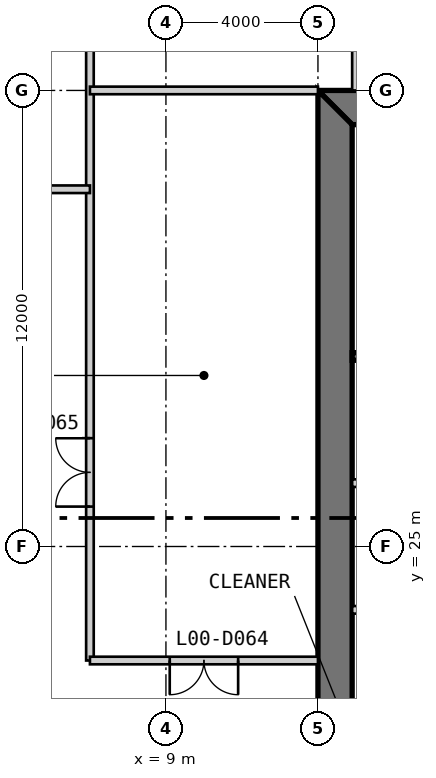
"""IFC4 building model, lengths in metres.
Left out: names, types, materials, properties, quantities, classifications, styles, units other than length and angle.
Written with IfcOpenShell. Run it as: python <this file> out.ifc"""

import sys

from ifc_helpers import new_model, si_unit, direction, frame, frame_2d, origin, place, context, subcontext, project, spatial, polyline, rectangle, outline, extrude, element, fill, save


model = new_model("IFC4")
c1 = context("Model", 3, precision=1e-05, world=origin(), true_north=direction((0.0, 1.0)))
c2 = subcontext(c1, "Body", "Model", "MODEL_VIEW")
j1 = project(units=[si_unit("LENGTHUNIT", "METRE"), si_unit("PLANEANGLEUNIT", "RADIAN")], contexts=[c1])
p1 = place(None, origin())
s1 = spatial("IfcSite", under=j1, at=p1, CompositionType="ELEMENT")
p2 = place(p1, origin())
s2 = spatial("IfcBuilding", under=s1, at=p2, CompositionType="ELEMENT")
p3 = place(p2, origin())
s3 = spatial("IfcBuildingStorey", under=s2, at=p3, CompositionType="ELEMENT", Elevation=0.0)
p4 = place(p3, frame((37.0, 36.55, 0.0), z_axis=(0.0, 0.0, 1.0), x_axis=(-1.0, 0.0, 0.0)))
e1 = element("IfcWall", 1, at=p4, inside=s3, PredefinedType="SHEAR", context=c2, shape_type="SweptSolid", body=[
    extrude(outline(polyline([(0.0, -0.45), (24.0, -0.45), (23.1, 0.45), (0.9, 0.45), (0.0, -0.45)])), origin(), (0.0, 0.0, 1.0), 7.0),
])
p5 = place(p4, frame((4.9, 0.0, 0.0)))
e2 = element("IfcOpeningElement", 2, at=p5, cuts=e1, PredefinedType="OPENING", context=c2, shape_type="SweptSolid", body=[
    extrude(rectangle(XDim=1.0, YDim=2.2, at=frame_2d((0.5, 1.1))), frame((0.0, 0.46, 0.0), z_axis=(0.0, -1.0, 0.0), x_axis=(1.0, 0.0, 0.0)), (0.0, 0.0, 1.0), 0.92),
])
p6 = place(p4, frame((8.9, 0.0, 0.0)))
e3 = element("IfcOpeningElement", 3, at=p6, cuts=e1, PredefinedType="OPENING", context=c2, shape_type="SweptSolid", body=[
    extrude(rectangle(XDim=1.1, YDim=2.2, at=frame_2d((0.55, 1.1))), frame((0.0, 0.46, 0.0), z_axis=(0.0, -1.0, 0.0), x_axis=(1.0, 0.0, 0.0)), (0.0, 0.0, 1.0), 0.92),
])
p7 = place(p4, frame((15.05, 0.0, 0.0)))
e4 = element("IfcOpeningElement", 4, at=p7, cuts=e1, PredefinedType="OPENING", context=c2, shape_type="SweptSolid", body=[
    extrude(rectangle(XDim=0.9, YDim=2.2, at=frame_2d((0.45, 1.1))), frame((0.0, 0.46, 0.0), z_axis=(0.0, -1.0, 0.0), x_axis=(1.0, 0.0, 0.0)), (0.0, 0.0, 1.0), 0.92),
])
p8 = place(p4, frame((17.9, 0.0, 0.0)))
e5 = element("IfcOpeningElement", 5, at=p8, cuts=e1, PredefinedType="OPENING", context=c2, shape_type="SweptSolid", body=[
    extrude(rectangle(XDim=1.0, YDim=2.2, at=frame_2d((0.5, 1.1))), frame((0.0, 0.46, 0.0), z_axis=(0.0, -1.0, 0.0), x_axis=(1.0, 0.0, 0.0)), (0.0, 0.0, 1.0), 0.92),
])
p9 = place(p4, frame((21.4, 0.0, 0.0)))
e6 = element("IfcOpeningElement", 6, at=p9, cuts=e1, PredefinedType="OPENING", context=c2, shape_type="SweptSolid", body=[
    extrude(rectangle(XDim=1.0, YDim=2.2, at=frame_2d((0.5, 1.1))), frame((0.0, 0.46, 0.0), z_axis=(0.0, -1.0, 0.0), x_axis=(1.0, 0.0, 0.0)), (0.0, 0.0, 1.0), 0.92),
])
p10 = place(p3, frame((13.45, 36.1, 0.0), z_axis=(0.0, 0.0, 1.0), x_axis=(0.0, -1.0, 0.0)))
e7 = element("IfcWall", 7, at=p10, inside=s3, PredefinedType="SHEAR", context=c2, shape_type="SweptSolid", body=[
    extrude(outline(polyline([(-0.9, -0.45), (23.1, -0.45), (22.2, 0.45), (0.0, 0.45), (-0.9, -0.45)])), origin(), (0.0, 0.0, 1.0), 7.0),
])
p11 = place(p10, frame((20.2, 0.0, 0.0)))
e8 = element("IfcOpeningElement", 8, at=p11, cuts=e7, PredefinedType="OPENING", context=c2, shape_type="SweptSolid", body=[
    extrude(rectangle(XDim=1.0, YDim=2.2, at=frame_2d((0.5, 1.1))), frame((0.0, 0.46, 0.0), z_axis=(0.0, -1.0, 0.0), x_axis=(1.0, 0.0, 0.0)), (0.0, 0.0, 1.0), 0.92),
])
p12 = place(p10, frame((17.25, 0.0, 0.0)))
e9 = element("IfcOpeningElement", 9, at=p12, cuts=e7, PredefinedType="OPENING", context=c2, shape_type="SweptSolid", body=[
    extrude(rectangle(XDim=0.9, YDim=2.2, at=frame_2d((0.45, 1.1))), frame((0.0, 0.46, 0.0), z_axis=(0.0, -1.0, 0.0), x_axis=(1.0, 0.0, 0.0)), (0.0, 0.0, 1.0), 0.92),
])
for number, where, z_axis, x_axis in (
    (10, (13.9, 23.333, 0.0), (0.0, 0.0, 1.0), (1.0, 0.0, 0.0)),
    (11, (13.9, 26.667, 0.0), (0.0, 0.0, 1.0), (1.0, 0.0, 0.0)),
):
    element("IfcWall", number, at=place(p3, frame(where, z_axis=z_axis, x_axis=x_axis)), inside=s3, PredefinedType="PARTITIONING", context=c2, shape_type="SweptSolid", body=[
        extrude(rectangle(XDim=2.8, YDim=0.2, at=frame_2d((1.4, 0.0))), origin(), (0.0, 0.0, 1.0), 6.8),
    ])
p13 = place(p3, frame((29.7, 30.0, 0.0), z_axis=(0.0, 0.0, 1.0), x_axis=(-1.0, 0.0, 0.0)))
e12 = element("IfcWall", 12, at=p13, inside=s3, PredefinedType="SOLIDWALL", context=c2, shape_type="SweptSolid", body=[
    extrude(rectangle(XDim=15.8, YDim=0.2, at=frame_2d((7.9, 0.0))), origin(), (0.0, 0.0, 1.0), 6.8),
])
p14 = place(p3, frame((7.0, 22.0, 0.0), z_axis=(0.0, 0.0, 1.0), x_axis=(0.0, 1.0, 0.0)))
e13 = element("IfcWall", 13, at=p14, inside=s3, PredefinedType="PARTITIONING", context=c2, shape_type="SweptSolid", body=[
    extrude(rectangle(XDim=21.0, YDim=0.2, at=frame_2d((10.5, 0.0))), origin(), (0.0, 0.0, 1.0), 6.043),
])
p15 = place(p14, frame((4.05, 0.0, 0.0)))
e14 = element("IfcOpeningElement", 14, at=p15, cuts=e13, PredefinedType="OPENING", context=c2, shape_type="SweptSolid", body=[
    extrude(rectangle(XDim=1.8, YDim=2.4, at=frame_2d((0.9, 1.2))), frame((0.0, 0.11, 0.0), z_axis=(0.0, -1.0, 0.0), x_axis=(1.0, 0.0, 0.0)), (0.0, 0.0, 1.0), 0.22),
])
p16 = place(p3, frame((14.0, 37.0, 0.0), z_axis=(0.0, 0.0, 1.0), x_axis=(0.0, 1.0, 0.0)))
e15 = element("IfcWall", 15, at=p16, inside=s3, PredefinedType="PARTITIONING", context=c2, shape_type="SweptSolid", body=[
    extrude(rectangle(XDim=6.0, YDim=0.2, at=frame_2d((3.0, 0.0))), origin(), (0.0, 0.0, 1.0), 6.7),
])
p17 = place(p16, frame((2.55, 0.0, 0.0)))
e16 = element("IfcOpeningElement", 16, at=p17, cuts=e15, PredefinedType="OPENING", context=c2, shape_type="SweptSolid", body=[
    extrude(rectangle(XDim=0.9, YDim=2.2, at=frame_2d((0.45, 1.1))), frame((0.0, 0.11, 0.0), z_axis=(0.0, -1.0, 0.0), x_axis=(1.0, 0.0, 0.0)), (0.0, 0.0, 1.0), 0.22),
])
p18 = place(p3, frame((7.0, 22.0, 0.0), z_axis=(0.0, 0.0, 1.0), x_axis=(1.0, 0.0, 0.0)))
e17 = element("IfcWall", 17, at=p18, inside=s3, PredefinedType="PARTITIONING", context=c2, shape_type="SweptSolid", body=[
    extrude(rectangle(XDim=6.0, YDim=0.2, at=frame_2d((3.0, 0.0))), origin(), (0.0, 0.0, 1.0), 6.7),
])
p19 = place(p18, frame((2.1, 0.0, 0.0)))
e18 = element("IfcOpeningElement", 18, at=p19, cuts=e17, PredefinedType="OPENING", context=c2, shape_type="SweptSolid", body=[
    extrude(rectangle(XDim=1.8, YDim=2.4, at=frame_2d((0.9, 1.2))), frame((0.0, 0.11, 0.0), z_axis=(0.0, -1.0, 0.0), x_axis=(1.0, 0.0, 0.0)), (0.0, 0.0, 1.0), 0.22),
])
p20 = place(p3, frame((-15.25, 34.4, 0.0), z_axis=(0.0, 0.0, 1.0), x_axis=(1.0, 0.0, 0.0)))
e19 = element("IfcWall", 19, at=p20, inside=s3, PredefinedType="PARTITIONING", context=c2, shape_type="SweptSolid", body=[
    extrude(rectangle(XDim=22.25, YDim=0.2, at=frame_2d((11.125, 0.0))), origin(), (0.0, 0.0, 1.0), 6.7),
])
p21 = place(p20, frame((17.525, 0.0, 0.0)))
e20 = element("IfcOpeningElement", 20, at=p21, cuts=e19, PredefinedType="OPENING", context=c2, shape_type="SweptSolid", body=[
    extrude(rectangle(XDim=1.8, YDim=2.4, at=frame_2d((0.9, 1.2))), frame((0.0, 0.11, 0.0), z_axis=(0.0, -1.0, 0.0), x_axis=(1.0, 0.0, 0.0)), (0.0, 0.0, 1.0), 0.22),
])
p22 = place(p20, frame((10.325, 0.0, 0.0)))
e21 = element("IfcOpeningElement", 21, at=p22, cuts=e19, PredefinedType="OPENING", context=c2, shape_type="SweptSolid", body=[
    extrude(rectangle(XDim=1.8, YDim=2.4, at=frame_2d((0.9, 1.2))), frame((0.0, 0.11, 0.0), z_axis=(0.0, -1.0, 0.0), x_axis=(1.0, 0.0, 0.0)), (0.0, 0.0, 1.0), 0.22),
])
p23 = place(p20, frame((3.025, 0.0, 0.0)))
e22 = element("IfcOpeningElement", 22, at=p23, cuts=e19, PredefinedType="OPENING", context=c2, shape_type="SweptSolid", body=[
    extrude(rectangle(XDim=1.8, YDim=2.4, at=frame_2d((0.9, 1.2))), frame((0.0, 0.11, 0.0), z_axis=(0.0, -1.0, 0.0), x_axis=(1.0, 0.0, 0.0)), (0.0, 0.0, 1.0), 0.22),
])
p24 = place(p3, frame((7.0, 37.0, 0.0), z_axis=(0.0, 0.0, 1.0), x_axis=(1.0, 0.0, 0.0)))
e23 = element("IfcWall", 23, at=p24, inside=s3, PredefinedType="PARTITIONING", context=c2, shape_type="SweptSolid", body=[
    extrude(rectangle(XDim=6.0, YDim=0.2, at=frame_2d((3.0, 0.0))), origin(), (0.0, 0.0, 1.0), 5.853),
])
p25 = place(p19, frame((1.8, 0.0, 0.0), z_axis=(0.0, 0.0, 1.0), x_axis=(-1.0, 0.0, 0.0)))
e24 = element("IfcDoor", 24, at=p25, inside=s3, OperationType="DOUBLE_DOOR_SINGLE_SWING", PredefinedType="DOOR", context=c2, shape_type="SweptSolid", body=[
    extrude(rectangle(XDim=1.8, YDim=2.4, at=frame_2d((0.9, 1.2))), frame((0.0, 0.025, 0.0), z_axis=(0.0, -1.0, 0.0), x_axis=(1.0, 0.0, 0.0)), (0.0, 0.0, 1.0), 0.05),
])
fill(e18, e24)
p26 = place(p15, origin())
e25 = element("IfcDoor", 25, at=p26, inside=s3, OperationType="DOUBLE_DOOR_SINGLE_SWING", PredefinedType="DOOR", context=c2, shape_type="SweptSolid", body=[
    extrude(rectangle(XDim=1.8, YDim=2.4, at=frame_2d((0.9, 1.2))), frame((0.0, 0.025, 0.0), z_axis=(0.0, -1.0, 0.0), x_axis=(1.0, 0.0, 0.0)), (0.0, 0.0, 1.0), 0.05),
])
fill(e14, e25)
save(model, sys.argv[1])
